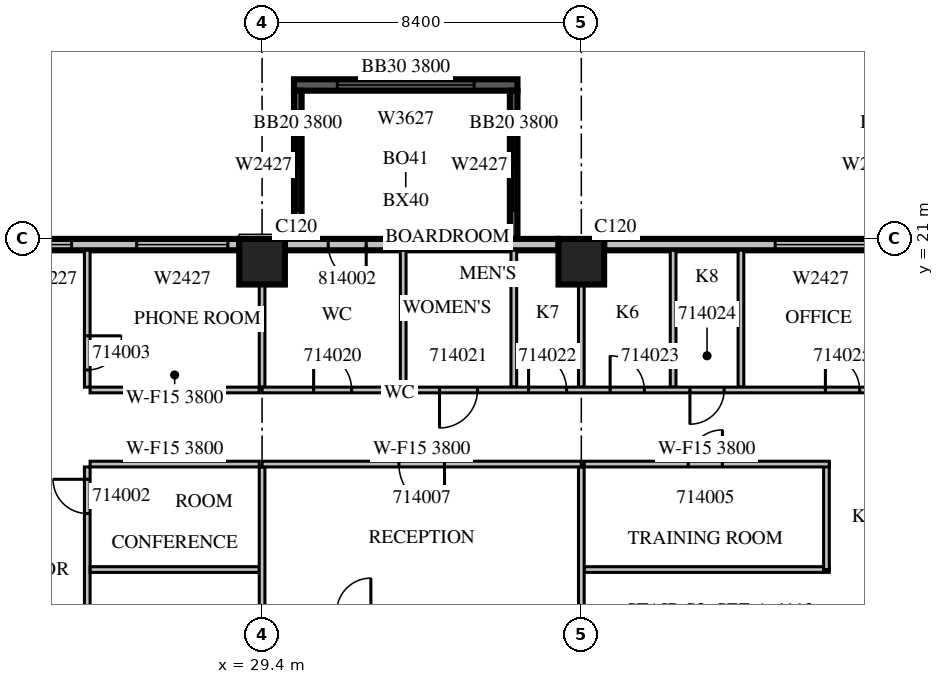
"""IFC4 building model, lengths in metres.
Left out: names, types, materials, properties, quantities, classifications, styles, units other than length and angle.
Written with IfcOpenShell. Run it as: python <this file> out.ifc"""

import sys

from ifc_helpers import new_model, si_unit, direction, frame, frame_2d, origin, origin_2d, place, context, subcontext, project, spatial, rectangle, extrude, source, transform, mapped, element, fill, save


model = new_model("IFC4")
c1 = context("Model", 3, precision=1e-05, world=origin(), true_north=direction((0.0, 1.0)))
c2 = subcontext(c1, "Body", "Model", "MODEL_VIEW")
j1 = project(units=[si_unit("LENGTHUNIT", "METRE"), si_unit("PLANEANGLEUNIT", "RADIAN")], contexts=[c1])
p1 = place(None, origin())
s1 = spatial("IfcSite", under=j1, at=p1, CompositionType="ELEMENT")
p2 = place(p1, origin())
s2 = spatial("IfcBuilding", under=s1, at=p2, CompositionType="ELEMENT")
p3 = place(p2, frame((0.0, 0.0, 69.9)))
s3 = spatial("IfcBuildingStorey", under=s2, at=p3, CompositionType="ELEMENT", Elevation=69.9)
m1 = source(origin(), c2, "Body", "SweptSolid", [
    extrude(rectangle(XDim=1.2, YDim=1.2, at=origin_2d()), origin(), (0.0, 0.0, 1.0), 4.2),
])
for number, where, z_axis, x_axis in (
    (1, (29.4, 20.4, 0.0), (0.0, 0.0, 1.0), (1.0, 0.0, 0.0)),
    (2, (37.8, 20.4, 0.0), (0.0, 0.0, 1.0), (1.0, 0.0, 0.0)),
):
    element("IfcColumn", number, at=place(p3, frame(where, z_axis=z_axis, x_axis=x_axis)), inside=s3, PredefinedType="COLUMN", context=c2, shape_type="MappedRepresentation", body=[
        mapped(m1, transform((0.0, 0.0, 0.0), scale=1.0)),
    ])
m2 = source(origin(), c2, "Body", "SweptSolid", [
    extrude(rectangle(XDim=5.88, YDim=0.3, at=frame_2d((2.94, 0.0))), origin(), (0.0, 0.0, 1.0), 3.8),
])
p4 = place(p3, frame((36.12, 25.05, 0.0), z_axis=(0.0, 0.0, 1.0), x_axis=(-1.0, 0.0, 0.0)))
e3 = element("IfcWall", 3, at=p4, inside=s3, PredefinedType="SOLIDWALL", context=c2, shape_type="MappedRepresentation", body=[
    mapped(m2, transform((0.0, 0.0, 0.0), scale=1.0)),
])
m3 = source(origin(), c2, "Body", "SweptSolid", [
    extrude(rectangle(XDim=3.6, YDim=2.7, at=frame_2d((1.8, 1.35))), frame((0.0, 0.16, 0.0), z_axis=(0.0, -1.0, 0.0), x_axis=(1.0, 0.0, 0.0)), (0.0, 0.0, 1.0), 0.32),
])
p5 = place(p4, frame((1.14, 0.0, 0.6)))
e4 = element("IfcOpeningElement", 4, at=p5, cuts=e3, PredefinedType="OPENING", context=c2, shape_type="MappedRepresentation", body=[
    mapped(m3, transform((0.0, 0.0, 0.0), scale=1.0)),
])
m4 = source(origin(), c2, "Body", "SweptSolid", [
    extrude(rectangle(XDim=3.9, YDim=0.2, at=frame_2d((1.95, 0.0))), origin(), (0.0, 0.0, 1.0), 3.8),
])
p6 = place(p3, frame((36.02, 21.0, 0.0), z_axis=(0.0, 0.0, 1.0), x_axis=(0.0, 1.0, 0.0)))
e5 = element("IfcWall", 5, at=p6, inside=s3, PredefinedType="SOLIDWALL", context=c2, shape_type="MappedRepresentation", body=[
    mapped(m4, transform((0.0, 0.0, 0.0), scale=1.0)),
])
m5 = source(origin(), c2, "Body", "SweptSolid", [
    extrude(rectangle(XDim=2.4, YDim=2.7, at=frame_2d((1.2, 1.35))), frame((0.0, 0.11, 0.0), z_axis=(0.0, -1.0, 0.0), x_axis=(1.0, 0.0, 0.0)), (0.0, 0.0, 1.0), 0.22),
])
p7 = place(p6, frame((0.75, 0.0, 0.6)))
e6 = element("IfcOpeningElement", 6, at=p7, cuts=e5, PredefinedType="OPENING", context=c2, shape_type="MappedRepresentation", body=[
    mapped(m5, transform((0.0, 0.0, 0.0), scale=1.0)),
])
p8 = place(p3, frame((30.34, 21.0, 0.0), z_axis=(0.0, 0.0, 1.0), x_axis=(0.0, 1.0, 0.0)))
e7 = element("IfcWall", 7, at=p8, inside=s3, PredefinedType="SOLIDWALL", context=c2, shape_type="MappedRepresentation", body=[
    mapped(m4, transform((0.0, 0.0, 0.0), scale=1.0)),
])
p9 = place(p8, frame((0.75, 0.0, 0.6)))
e8 = element("IfcOpeningElement", 8, at=p9, cuts=e7, PredefinedType="OPENING", context=c2, shape_type="MappedRepresentation", body=[
    mapped(m5, transform((0.0, 0.0, 0.0), scale=1.0)),
])
m6 = source(origin(), c2, "Body", "SweptSolid", [
    extrude(rectangle(XDim=7.2, YDim=0.3, at=frame_2d((3.6, 0.0))), origin(), (0.0, 0.0, 1.0), 3.8),
])
p10 = place(p3, frame((45.6, 20.85, 0.0), z_axis=(0.0, 0.0, 1.0), x_axis=(-1.0, 0.0, 0.0)))
e9 = element("IfcWall", 9, at=p10, inside=s3, PredefinedType="STANDARD", context=c2, shape_type="MappedRepresentation", body=[
    mapped(m6, transform((0.0, 0.0, 0.0), scale=1.0)),
])
m7 = source(origin(), c2, "Body", "SweptSolid", [
    extrude(rectangle(XDim=2.4, YDim=2.7, at=frame_2d((1.2, 1.35))), frame((0.0, 0.16, 0.0), z_axis=(0.0, -1.0, 0.0), x_axis=(1.0, 0.0, 0.0)), (0.0, 0.0, 1.0), 0.32),
])
p11 = place(p10, frame((0.3, 0.0, 0.6)))
e10 = element("IfcOpeningElement", 10, at=p11, cuts=e9, PredefinedType="OPENING", context=c2, shape_type="MappedRepresentation", body=[
    mapped(m7, transform((0.0, 0.0, 0.0), scale=1.0)),
])
p12 = place(p3, frame((37.2, 20.85, 0.0), z_axis=(0.0, 0.0, 1.0), x_axis=(-1.0, 0.0, 0.0)))
e11 = element("IfcWall", 11, at=p12, inside=s3, PredefinedType="STANDARD", context=c2, shape_type="MappedRepresentation", body=[
    mapped(m6, transform((0.0, 0.0, 0.0), scale=1.0)),
])
m8 = source(origin(), c2, "Body", "SweptSolid", [
    extrude(rectangle(XDim=1.0, YDim=2.1, at=frame_2d((0.5, 1.05))), frame((0.0, 0.16, 0.0), z_axis=(0.0, -1.0, 0.0), x_axis=(1.0, 0.0, 0.0)), (0.0, 0.0, 1.0), 0.32),
])
p13 = place(p12, frame((5.06, 0.0, 0.0)))
e12 = element("IfcOpeningElement", 12, at=p13, cuts=e11, PredefinedType="OPENING", context=c2, shape_type="MappedRepresentation", body=[
    mapped(m8, transform((0.0, 0.0, 0.0), scale=1.0)),
])
m9 = source(origin(), c2, "Body", "SweptSolid", [
    extrude(rectangle(XDim=6.6, YDim=0.3, at=frame_2d((3.3, 0.0))), origin(), (0.0, 0.0, 1.0), 3.8),
])
p14 = place(p3, frame((28.8, 20.85, 0.0), z_axis=(0.0, 0.0, 1.0), x_axis=(-1.0, 0.0, 0.0)))
e13 = element("IfcWall", 13, at=p14, inside=s3, PredefinedType="STANDARD", context=c2, shape_type="MappedRepresentation", body=[
    mapped(m9, transform((0.0, 0.0, 0.0), scale=1.0)),
])
p15 = place(p14, frame((0.3, 0.0, 0.6)))
e14 = element("IfcOpeningElement", 14, at=p15, cuts=e13, PredefinedType="OPENING", context=c2, shape_type="MappedRepresentation", body=[
    mapped(m7, transform((0.0, 0.0, 0.0), scale=1.0)),
])
m10 = source(origin(), c2, "Body", "SweptSolid", [
    extrude(rectangle(XDim=1.2, YDim=2.7, at=frame_2d((0.6, 1.35))), frame((0.0, 0.16, 0.0), z_axis=(0.0, -1.0, 0.0), x_axis=(1.0, 0.0, 0.0)), (0.0, 0.0, 1.0), 0.32),
])
p16 = place(p14, frame((4.412, 0.0, 0.6)))
e15 = element("IfcOpeningElement", 15, at=p16, cuts=e13, PredefinedType="OPENING", context=c2, shape_type="MappedRepresentation", body=[
    mapped(m10, transform((0.0, 0.0, 0.0), scale=1.0)),
])
m11 = source(origin(), c2, "Body", "SweptSolid", [
    extrude(rectangle(XDim=11.925, YDim=0.15, at=frame_2d((5.963, 0.0))), origin(), (0.0, 0.0, 1.0), 3.8),
])
p17 = place(p3, frame((24.8, 15.0, 0.0), z_axis=(0.0, 0.0, 1.0), x_axis=(0.0, -1.0, 0.0)))
e16 = element("IfcWall", 16, at=p17, inside=s3, PredefinedType="PARTITIONING", context=c2, shape_type="MappedRepresentation", body=[
    mapped(m11, transform((0.0, 0.0, 0.0), scale=1.0)),
])
m12 = source(origin(), c2, "Body", "SweptSolid", [
    extrude(rectangle(XDim=0.9, YDim=2.1, at=frame_2d((0.45, 1.05))), frame((0.0, 0.085, 0.0), z_axis=(0.0, -1.0, 0.0), x_axis=(1.0, 0.0, 0.0)), (0.0, 0.0, 1.0), 0.17),
])
p18 = place(p17, frame((7.162, 0.0, 0.0)))
e17 = element("IfcOpeningElement", 17, at=p18, cuts=e16, PredefinedType="OPENING", context=c2, shape_type="MappedRepresentation", body=[
    mapped(m12, transform((0.0, 0.0, 0.0), scale=1.0)),
])
p19 = place(p17, frame((0.325, 0.0, 0.0)))
e18 = element("IfcOpeningElement", 18, at=p19, cuts=e16, PredefinedType="OPENING", context=c2, shape_type="MappedRepresentation", body=[
    mapped(m12, transform((0.0, 0.0, 0.0), scale=1.0)),
])
m13 = source(origin(), c2, "Body", "SweptSolid", [
    extrude(rectangle(XDim=3.6, YDim=0.15, at=frame_2d((1.8, 0.0))), origin(), (0.0, 0.0, 1.0), 3.8),
])
p20 = place(p3, frame((24.8, 20.7, 0.0), z_axis=(0.0, 0.0, 1.0), x_axis=(0.0, -1.0, 0.0)))
e19 = element("IfcWall", 19, at=p20, inside=s3, PredefinedType="PARTITIONING", context=c2, shape_type="MappedRepresentation", body=[
    mapped(m13, transform((0.0, 0.0, 0.0), scale=1.0)),
])
p21 = place(p20, frame((2.25, 0.0, 0.0)))
e20 = element("IfcOpeningElement", 20, at=p21, cuts=e19, PredefinedType="OPENING", context=c2, shape_type="MappedRepresentation", body=[
    mapped(m12, transform((0.0, 0.0, 0.0), scale=1.0)),
])
m14 = source(origin(), c2, "Body", "SweptSolid", [
    extrude(rectangle(XDim=4.45, YDim=0.15, at=frame_2d((2.225, 0.0))), origin(), (0.0, 0.0, 1.0), 3.8),
])
for number, where, z_axis, x_axis in (
    (21, (29.325, 12.3, 0.0), (0.0, 0.0, 1.0), (-1.0, 0.0, 0.0)),
    (22, (29.325, 15.075, 0.0), (0.0, 0.0, 1.0), (-1.0, 0.0, 0.0)),
    (23, (24.875, 17.025, 0.0), (0.0, 0.0, 1.0), (1.0, 0.0, 0.0)),
):
    element("IfcWall", number, at=place(p3, frame(where, z_axis=z_axis, x_axis=x_axis)), inside=s3, PredefinedType="PARTITIONING", context=c2, shape_type="MappedRepresentation", body=[
        mapped(m14, transform((0.0, 0.0, 0.0), scale=1.0)),
    ])
m15 = source(origin(), c2, "Body", "SweptSolid", [
    extrude(rectangle(XDim=3.901, YDim=0.15, at=frame_2d((1.95, 0.0))), origin(), (0.0, 0.0, 1.0), 3.8),
])
p22 = place(p3, frame((29.4, 11.099, 0.0), z_axis=(0.0, 0.0, 1.0), x_axis=(0.0, 1.0, 0.0)))
e24 = element("IfcWall", 24, at=p22, inside=s3, PredefinedType="PARTITIONING", context=c2, shape_type="MappedRepresentation", body=[
    mapped(m15, transform((0.0, 0.0, 0.0), scale=1.0)),
])
m16 = source(origin(), c2, "Body", "SweptSolid", [
    extrude(rectangle(XDim=2.701, YDim=0.15, at=frame_2d((1.351, 0.0))), origin(), (0.0, 0.0, 1.0), 3.8),
])
p23 = place(p3, frame((29.4, 17.1, 0.0), z_axis=(0.0, 0.0, 1.0), x_axis=(0.0, 1.0, 0.0)))
e25 = element("IfcWall", 25, at=p23, inside=s3, PredefinedType="PARTITIONING", context=c2, shape_type="MappedRepresentation", body=[
    mapped(m16, transform((0.0, 0.0, 0.0), scale=1.0)),
])
m17 = source(origin(), c2, "Body", "SweptSolid", [
    extrude(rectangle(XDim=6.45, YDim=0.15, at=frame_2d((3.225, 0.0))), origin(), (0.0, 0.0, 1.0), 3.8),
])
p24 = place(p3, frame((37.875, 12.3, 0.0), z_axis=(0.0, 0.0, 1.0), x_axis=(1.0, 0.0, 0.0)))
e26 = element("IfcWall", 26, at=p24, inside=s3, PredefinedType="PARTITIONING", context=c2, shape_type="MappedRepresentation", body=[
    mapped(m17, transform((0.0, 0.0, 0.0), scale=1.0)),
])
m18 = source(origin(), c2, "Body", "SweptSolid", [
    extrude(rectangle(XDim=2.775, YDim=0.15, at=frame_2d((1.387, 0.0))), origin(), (0.0, 0.0, 1.0), 3.8),
])
p25 = place(p3, frame((44.25, 12.3, 0.0), z_axis=(0.0, 0.0, 1.0), x_axis=(0.0, 1.0, 0.0)))
e27 = element("IfcWall", 27, at=p25, inside=s3, PredefinedType="PARTITIONING", context=c2, shape_type="MappedRepresentation", body=[
    mapped(m18, transform((0.0, 0.0, 0.0), scale=1.0)),
])
p26 = place(p3, frame((44.325, 15.075, 0.0), z_axis=(0.0, 0.0, 1.0), x_axis=(-1.0, 0.0, 0.0)))
e28 = element("IfcWall", 28, at=p26, inside=s3, PredefinedType="PARTITIONING", context=c2, shape_type="MappedRepresentation", body=[
    mapped(m17, transform((0.0, 0.0, 0.0), scale=1.0)),
])
p27 = place(p26, frame((2.812, 0.0, 0.0)))
e29 = element("IfcOpeningElement", 29, at=p27, cuts=e28, PredefinedType="OPENING", context=c2, shape_type="MappedRepresentation", body=[
    mapped(m12, transform((0.0, 0.0, 0.0), scale=1.0)),
])
m19 = source(origin(), c2, "Body", "SweptSolid", [
    extrude(rectangle(XDim=3.75, YDim=0.15, at=frame_2d((1.875, 0.0))), origin(), (0.0, 0.0, 1.0), 3.8),
])
p28 = place(p3, frame((37.8, 11.25, 0.0), z_axis=(0.0, 0.0, 1.0), x_axis=(0.0, 1.0, 0.0)))
e30 = element("IfcWall", 30, at=p28, inside=s3, PredefinedType="PARTITIONING", context=c2, shape_type="MappedRepresentation", body=[
    mapped(m19, transform((0.0, 0.0, 0.0), scale=1.0)),
])
for number, where, z_axis, x_axis in (
    (31, (33.113, 20.7, 0.0), (0.0, 0.0, 1.0), (0.0, -1.0, 0.0)),
    (32, (36.024, 20.7, 0.0), (0.0, 0.0, 1.0), (0.0, -1.0, 0.0)),
    (33, (40.216, 20.7, 0.0), (0.0, 0.0, 1.0), (0.0, -1.0, 0.0)),
):
    element("IfcWall", number, at=place(p3, frame(where, z_axis=z_axis, x_axis=x_axis)), inside=s3, PredefinedType="PARTITIONING", context=c2, shape_type="MappedRepresentation", body=[
        mapped(m13, transform((0.0, 0.0, 0.0), scale=1.0)),
    ])
p29 = place(p3, frame((37.8, 17.1, 0.0), z_axis=(0.0, 0.0, 1.0), x_axis=(0.0, 1.0, 0.0)))
e34 = element("IfcWall", 34, at=p29, inside=s3, PredefinedType="PARTITIONING", context=c2, shape_type="MappedRepresentation", body=[
    mapped(m16, transform((0.0, 0.0, 0.0), scale=1.0)),
])
p30 = place(p3, frame((42.0, 17.1, 0.0), z_axis=(0.0, 0.0, 1.0), x_axis=(0.0, 1.0, 0.0)))
e35 = element("IfcWall", 35, at=p30, inside=s3, PredefinedType="PARTITIONING", context=c2, shape_type="MappedRepresentation", body=[
    mapped(m13, transform((0.0, 0.0, 0.0), scale=1.0)),
])
m20 = source(origin(), c2, "Body", "SweptSolid", [
    extrude(rectangle(XDim=8.4, YDim=0.15, at=frame_2d((4.2, 0.0))), origin(), (0.0, 0.0, 1.0), 3.8),
])
p31 = place(p3, frame((37.8, 15.075, 0.0), z_axis=(0.0, 0.0, 1.0), x_axis=(-1.0, 0.0, 0.0)))
e36 = element("IfcWall", 36, at=p31, inside=s3, PredefinedType="PARTITIONING", context=c2, shape_type="MappedRepresentation", body=[
    mapped(m20, transform((0.0, 0.0, 0.0), scale=1.0)),
])
m21 = source(origin(), c2, "Body", "SweptSolid", [
    extrude(rectangle(XDim=1.2, YDim=2.1, at=frame_2d((0.6, 1.05))), frame((0.0, 0.085, 0.0), z_axis=(0.0, -1.0, 0.0), x_axis=(1.0, 0.0, 0.0)), (0.0, 0.0, 1.0), 0.17),
])
p32 = place(p31, frame((3.6, 0.0, 0.0)))
e37 = element("IfcOpeningElement", 37, at=p32, cuts=e36, PredefinedType="OPENING", context=c2, shape_type="MappedRepresentation", body=[
    mapped(m21, transform((0.0, 0.0, 0.0), scale=1.0)),
])
m22 = source(origin(), c2, "Body", "SweptSolid", [
    extrude(rectangle(XDim=37.5, YDim=0.15, at=frame_2d((18.75, 0.0))), origin(), (0.0, 0.0, 1.0), 3.3),
])
p33 = place(p3, frame((29.4, 17.025, 0.0), z_axis=(0.0, 0.0, 1.0), x_axis=(1.0, 0.0, 0.0)))
e38 = element("IfcWall", 38, at=p33, inside=s3, PredefinedType="PARTITIONING", context=c2, shape_type="MappedRepresentation", body=[
    mapped(m22, transform((0.0, 0.0, 0.0), scale=1.0)),
])
m23 = source(origin(), c2, "Body", "SweptSolid", [
    extrude(rectangle(XDim=1.0, YDim=2.1, at=frame_2d((0.5, 1.05))), frame((0.0, 0.085, 0.0), z_axis=(0.0, -1.0, 0.0), x_axis=(1.0, 0.0, 0.0)), (0.0, 0.0, 1.0), 0.17),
])
p34 = place(p33, frame((1.357, 0.0, 0.0)))
e39 = element("IfcOpeningElement", 39, at=p34, cuts=e38, PredefinedType="OPENING", context=c2, shape_type="MappedRepresentation", body=[
    mapped(m23, transform((0.0, 0.0, 0.0), scale=1.0)),
])
p35 = place(p33, frame((4.669, 0.0, 0.0)))
e40 = element("IfcOpeningElement", 40, at=p35, cuts=e38, PredefinedType="OPENING", context=c2, shape_type="MappedRepresentation", body=[
    mapped(m23, transform((0.0, 0.0, 0.0), scale=1.0)),
])
p36 = place(p33, frame((7.012, 0.0, 0.0)))
e41 = element("IfcOpeningElement", 41, at=p36, cuts=e38, PredefinedType="OPENING", context=c2, shape_type="MappedRepresentation", body=[
    mapped(m23, transform((0.0, 0.0, 0.0), scale=1.0)),
])
p37 = place(p33, frame((9.158, 0.0, 0.0)))
e42 = element("IfcOpeningElement", 42, at=p37, cuts=e38, PredefinedType="OPENING", context=c2, shape_type="MappedRepresentation", body=[
    mapped(m12, transform((0.0, 0.0, 0.0), scale=1.0)),
])
p38 = place(p33, frame((11.258, 0.0, 0.0)))
e43 = element("IfcOpeningElement", 43, at=p38, cuts=e38, PredefinedType="OPENING", context=c2, shape_type="MappedRepresentation", body=[
    mapped(m12, transform((0.0, 0.0, 0.0), scale=1.0)),
])
p39 = place(p33, frame((14.822, 0.0, 0.0)))
e44 = element("IfcOpeningElement", 44, at=p39, cuts=e38, PredefinedType="OPENING", context=c2, shape_type="MappedRepresentation", body=[
    mapped(m12, transform((0.0, 0.0, 0.0), scale=1.0)),
])
p40 = place(p33, frame((20.13, 0.0, 0.0)))
e45 = element("IfcOpeningElement", 45, at=p40, cuts=e38, PredefinedType="OPENING", context=c2, shape_type="MappedRepresentation", body=[
    mapped(m12, transform((0.0, 0.0, 0.0), scale=1.0)),
])
p41 = place(p33, frame((25.438, 0.0, 0.0)))
e46 = element("IfcOpeningElement", 46, at=p41, cuts=e38, PredefinedType="OPENING", context=c2, shape_type="MappedRepresentation", body=[
    mapped(m12, transform((0.0, 0.0, 0.0), scale=1.0)),
])
p42 = place(p33, frame((30.364, 0.0, 0.0)))
e47 = element("IfcOpeningElement", 47, at=p42, cuts=e38, PredefinedType="OPENING", context=c2, shape_type="MappedRepresentation", body=[
    mapped(m12, transform((0.0, 0.0, 0.0), scale=1.0)),
])
p43 = place(p33, frame((34.871, 0.0, 0.0)))
e48 = element("IfcOpeningElement", 48, at=p43, cuts=e38, PredefinedType="OPENING", context=c2, shape_type="MappedRepresentation", body=[
    mapped(m12, transform((0.0, 0.0, 0.0), scale=1.0)),
])
m24 = source(origin(), c2, "Body", "SweptSolid", [
    extrude(rectangle(XDim=3.6, YDim=2.7, at=frame_2d((1.8, 1.35))), frame((0.0, 0.03, 0.0), z_axis=(0.0, -1.0, 0.0), x_axis=(1.0, 0.0, 0.0)), (0.0, 0.0, 1.0), 0.06),
])
p44 = place(p5, origin())
e49 = element("IfcWindow", 49, at=p44, inside=s3, PartitioningType="SINGLE_PANEL", PredefinedType="WINDOW", context=c2, shape_type="MappedRepresentation", body=[
    mapped(m24, transform((0.0, 0.0, 0.0), scale=1.0)),
])
fill(e4, e49)
m25 = source(origin(), c2, "Body", "SweptSolid", [
    extrude(rectangle(XDim=2.4, YDim=2.7, at=frame_2d((1.2, 1.35))), frame((0.0, 0.03, 0.0), z_axis=(0.0, -1.0, 0.0), x_axis=(1.0, 0.0, 0.0)), (0.0, 0.0, 1.0), 0.06),
])
p45 = place(p7, origin())
e50 = element("IfcWindow", 50, at=p45, inside=s3, PartitioningType="SINGLE_PANEL", PredefinedType="WINDOW", context=c2, shape_type="MappedRepresentation", body=[
    mapped(m25, transform((0.0, 0.0, 0.0), scale=1.0)),
])
fill(e6, e50)
p46 = place(p9, origin())
e51 = element("IfcWindow", 51, at=p46, inside=s3, PartitioningType="SINGLE_PANEL", PredefinedType="WINDOW", context=c2, shape_type="MappedRepresentation", body=[
    mapped(m25, transform((0.0, 0.0, 0.0), scale=1.0)),
])
fill(e8, e51)
p47 = place(p11, origin())
e52 = element("IfcWindow", 52, at=p47, inside=s3, PartitioningType="SINGLE_PANEL", PredefinedType="WINDOW", context=c2, shape_type="MappedRepresentation", body=[
    mapped(m25, transform((0.0, 0.0, 0.0), scale=1.0)),
])
fill(e10, e52)
p48 = place(p15, origin())
e53 = element("IfcWindow", 53, at=p48, inside=s3, PartitioningType="SINGLE_PANEL", PredefinedType="WINDOW", context=c2, shape_type="MappedRepresentation", body=[
    mapped(m25, transform((0.0, 0.0, 0.0), scale=1.0)),
])
fill(e14, e53)
m26 = source(origin(), c2, "Body", "SweptSolid", [
    extrude(rectangle(XDim=1.2, YDim=2.7, at=frame_2d((0.6, 1.35))), frame((0.0, 0.03, 0.0), z_axis=(0.0, -1.0, 0.0), x_axis=(1.0, 0.0, 0.0)), (0.0, 0.0, 1.0), 0.06),
])
p49 = place(p16, origin())
e54 = element("IfcWindow", 54, at=p49, inside=s3, PartitioningType="SINGLE_PANEL", PredefinedType="WINDOW", context=c2, shape_type="MappedRepresentation", body=[
    mapped(m26, transform((0.0, 0.0, 0.0), scale=1.0)),
])
fill(e15, e54)
m27 = source(origin(), c2, "Body", "SweptSolid", [
    extrude(rectangle(XDim=0.9, YDim=2.1, at=frame_2d((0.45, 1.05))), frame((0.0, 0.025, 0.0), z_axis=(0.0, -1.0, 0.0), x_axis=(1.0, 0.0, 0.0)), (0.0, 0.0, 1.0), 0.05),
])
p50 = place(p19, origin())
e55 = element("IfcDoor", 55, at=p50, inside=s3, OperationType="SINGLE_SWING_RIGHT", PredefinedType="DOOR", context=c2, shape_type="MappedRepresentation", body=[
    mapped(m27, transform((0.0, 0.0, 0.0), scale=1.0)),
])
fill(e18, e55)
p51 = place(p21, origin())
e56 = element("IfcDoor", 56, at=p51, inside=s3, OperationType="SINGLE_SWING_LEFT", PredefinedType="DOOR", context=c2, shape_type="MappedRepresentation", body=[
    mapped(m27, transform((0.0, 0.0, 0.0), scale=1.0)),
])
fill(e20, e56)
p52 = place(p27, origin())
e57 = element("IfcDoor", 57, at=p52, inside=s3, OperationType="SINGLE_SWING_RIGHT", PredefinedType="DOOR", context=c2, shape_type="MappedRepresentation", body=[
    mapped(m27, transform((0.0, 0.0, 0.0), scale=1.0)),
])
fill(e29, e57)
m28 = source(origin(), c2, "Body", "SweptSolid", [
    extrude(rectangle(XDim=1.2, YDim=2.1, at=frame_2d((0.6, 1.05))), frame((0.0, 0.025, 0.0), z_axis=(0.0, -1.0, 0.0), x_axis=(1.0, 0.0, 0.0)), (0.0, 0.0, 1.0), 0.05),
])
p53 = place(p32, origin())
e58 = element("IfcDoor", 58, at=p53, inside=s3, OperationType="SINGLE_SWING_LEFT", PredefinedType="DOOR", context=c2, shape_type="MappedRepresentation", body=[
    mapped(m28, transform((0.0, 0.0, 0.0), scale=1.0)),
])
fill(e37, e58)
m29 = source(origin(), c2, "Body", "SweptSolid", [
    extrude(rectangle(XDim=1.0, YDim=2.1, at=frame_2d((0.5, 1.05))), frame((0.0, 0.025, 0.0), z_axis=(0.0, -1.0, 0.0), x_axis=(1.0, 0.0, 0.0)), (0.0, 0.0, 1.0), 0.05),
])
p54 = place(p34, origin())
e59 = element("IfcDoor", 59, at=p54, inside=s3, OperationType="SINGLE_SWING_LEFT", PredefinedType="DOOR", context=c2, shape_type="MappedRepresentation", body=[
    mapped(m29, transform((0.0, 0.0, 0.0), scale=1.0)),
])
fill(e39, e59)
p55 = place(p35, origin())
e60 = element("IfcDoor", 60, at=p55, inside=s3, OperationType="SINGLE_SWING_RIGHT", PredefinedType="DOOR", context=c2, shape_type="MappedRepresentation", body=[
    mapped(m29, transform((0.0, 0.0, 0.0), scale=1.0)),
])
fill(e40, e60)
p56 = place(p36, origin())
e61 = element("IfcDoor", 61, at=p56, inside=s3, OperationType="SINGLE_SWING_LEFT", PredefinedType="DOOR", context=c2, shape_type="MappedRepresentation", body=[
    mapped(m29, transform((0.0, 0.0, 0.0), scale=1.0)),
])
fill(e41, e61)
p57 = place(p37, origin())
e62 = element("IfcDoor", 62, at=p57, inside=s3, OperationType="SINGLE_SWING_LEFT", PredefinedType="DOOR", context=c2, shape_type="MappedRepresentation", body=[
    mapped(m27, transform((0.0, 0.0, 0.0), scale=1.0)),
])
fill(e42, e62)
p58 = place(p38, origin())
e63 = element("IfcDoor", 63, at=p58, inside=s3, OperationType="SINGLE_SWING_RIGHT", PredefinedType="DOOR", context=c2, shape_type="MappedRepresentation", body=[
    mapped(m27, transform((0.0, 0.0, 0.0), scale=1.0)),
])
fill(e43, e63)
p59 = place(p39, origin())
e64 = element("IfcDoor", 64, at=p59, inside=s3, OperationType="SINGLE_SWING_LEFT", PredefinedType="DOOR", context=c2, shape_type="MappedRepresentation", body=[
    mapped(m27, transform((0.0, 0.0, 0.0), scale=1.0)),
])
fill(e44, e64)
p60 = place(p13, origin())
e65 = element("IfcDoor", 65, at=p60, inside=s3, OperationType="SINGLE_SWING_LEFT", PredefinedType="DOOR", context=c2, shape_type="MappedRepresentation", body=[
    mapped(m29, transform((0.0, 0.0, 0.0), scale=1.0)),
])
fill(e12, e65)
save(model, sys.argv[1])
